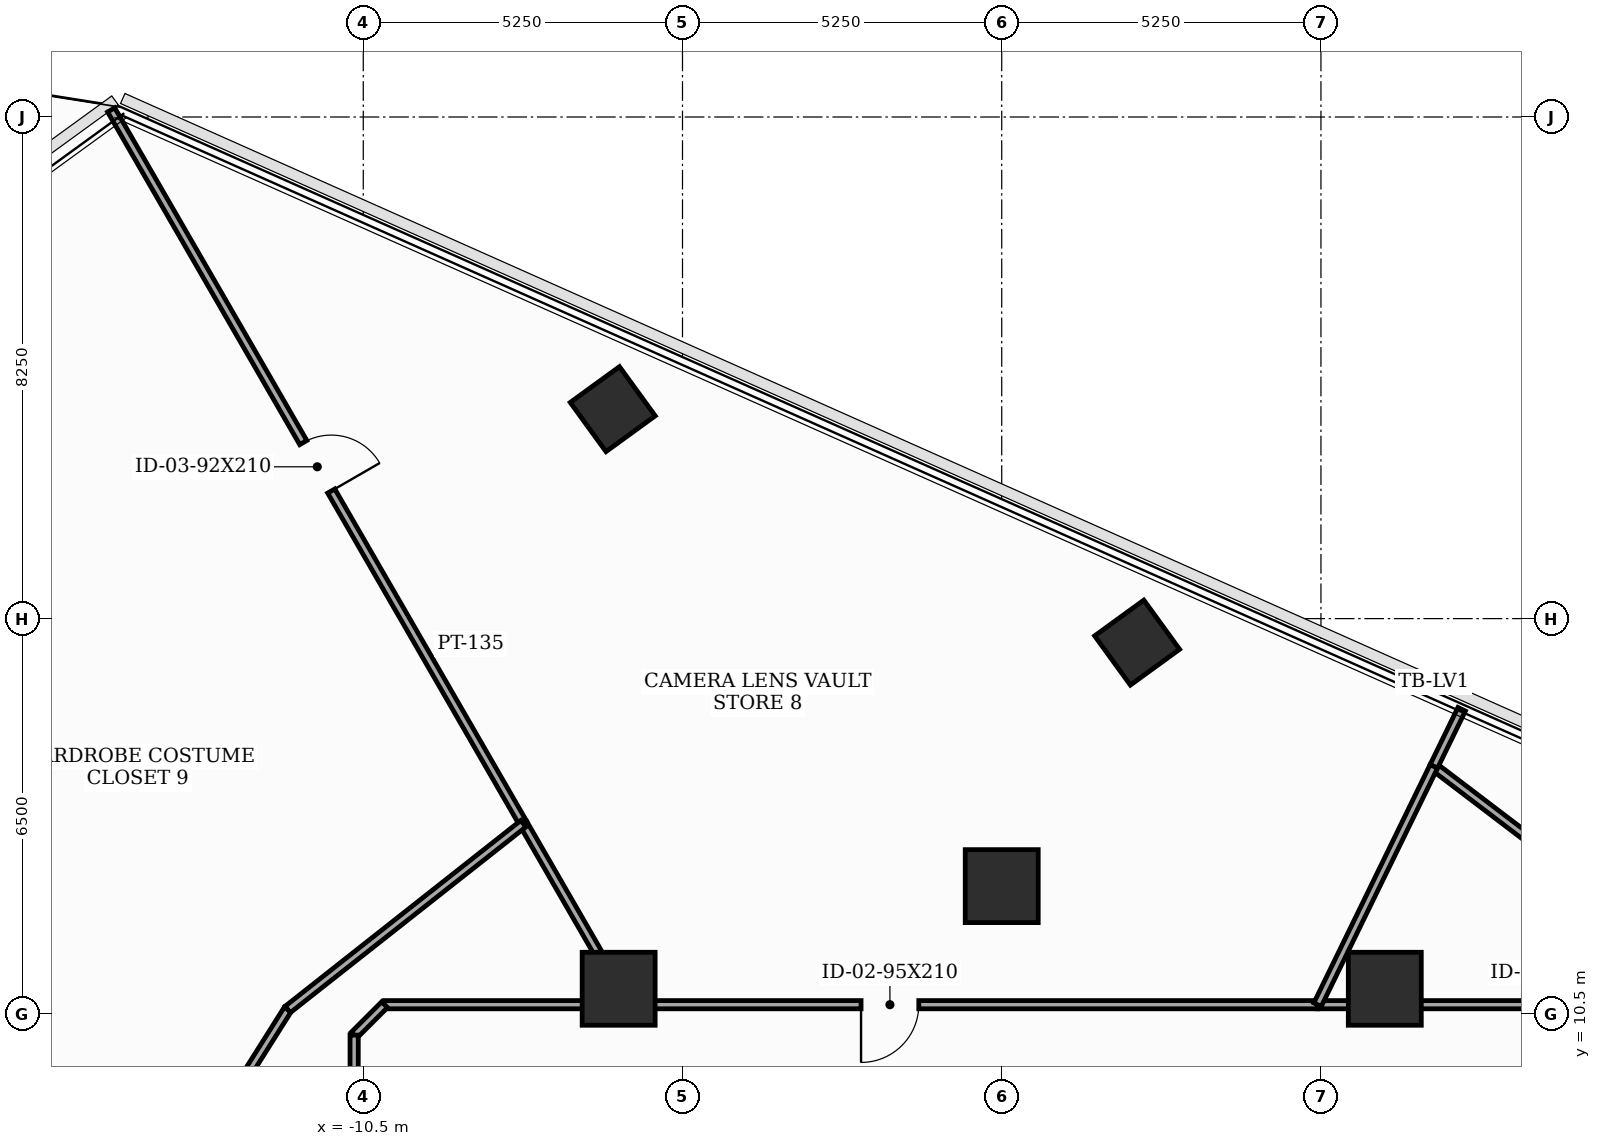
"""IFC4 building model, lengths in metres.
Left out: names, types, materials, properties, quantities, classifications, styles, units other than length and angle.
Written with IfcOpenShell. Run it as: python <this file> out.ifc"""

import sys

from ifc_helpers import new_model, si_unit, direction, frame, frame_2d, origin, origin_2d, place, context, subcontext, project, spatial, rectangle, extrude, element, fill, save


model = new_model("IFC4")
c1 = context("Model", 3, precision=1e-05, world=origin(), true_north=direction((0.0, 1.0)))
c2 = subcontext(c1, "Body", "Model", "MODEL_VIEW")
j1 = project(units=[si_unit("LENGTHUNIT", "METRE"), si_unit("PLANEANGLEUNIT", "RADIAN")], contexts=[c1])
p1 = place(None, origin())
s1 = spatial("IfcSite", under=j1, at=p1, CompositionType="ELEMENT")
p2 = place(p1, origin())
s2 = spatial("IfcBuilding", under=s1, at=p2, CompositionType="ELEMENT")
p3 = place(p2, frame((0.0, 0.0, 162.0)))
s3 = spatial("IfcBuildingStorey", under=s2, at=p3, CompositionType="ELEMENT", Elevation=162.0)
for number, where, z_axis, x_axis in (
    (1, (6.3, 10.912, 0.0), (0.0, 0.0, 1.0), (1.0, 0.0, 0.0)),
    (2, (0.0, 12.6, 0.0), (0.0, 0.0, 1.0), (1.0, 0.0, 0.0)),
    (3, (-6.3, 10.912, 0.0), (0.0, 0.0, 1.0), (1.0, 0.0, 0.0)),
):
    element("IfcColumn", number, at=place(p3, frame(where, z_axis=z_axis, x_axis=x_axis)), inside=s3, PredefinedType="COLUMN", context=c2, shape_type="SweptSolid", body=[
        extrude(rectangle(XDim=1.2, YDim=1.2, at=origin_2d()), origin(), (0.0, 0.0, 1.0), 3.7),
    ])
for number, where, z_axis, x_axis in (
    (4, (2.227, 16.605, 0.0), (0.0, 0.0, 1.0), (0.809, 0.588, 0.0)),
    (5, (-6.397, 20.445, 0.0), (0.0, 0.0, 1.0), (0.809, 0.588, 0.0)),
):
    element("IfcColumn", number, at=place(p3, frame(where, z_axis=z_axis, x_axis=x_axis)), inside=s3, PredefinedType="COLUMN", context=c2, shape_type="SweptSolid", body=[
        extrude(rectangle(XDim=1.0, YDim=1.0, at=origin_2d()), origin(), (0.0, 0.0, 1.0), 3.7),
    ])
p4 = place(p3, frame((10.15, 10.65, 0.0), z_axis=(0.0, 0.0, 1.0), x_axis=(-1.0, 0.0, 0.0)))
e6 = element("IfcWall", 6, at=p4, inside=s3, PredefinedType="PARTITIONING", context=c2, shape_type="SweptSolid", body=[
    extrude(rectangle(XDim=4.956, YDim=0.135, at=frame_2d((2.478, 0.0))), origin(), (0.0, 0.0, 1.0), 2.885),
])
p5 = place(p4, frame((0.516, 0.0, 0.0)))
e7 = element("IfcOpeningElement", 7, at=p5, cuts=e6, PredefinedType="OPENING", context=c2, shape_type="SweptSolid", body=[
    extrude(rectangle(XDim=0.95, YDim=2.1, at=frame_2d((0.475, 1.05))), frame((0.0, 0.077, 0.0), z_axis=(0.0, -1.0, 0.0), x_axis=(1.0, 0.0, 0.0)), (0.0, 0.0, 1.0), 0.155),
])
p6 = place(p3, frame((5.194, 10.65, 0.0), z_axis=(0.0, 0.0, 1.0), x_axis=(-1.0, 0.0, 0.0)))
e8 = element("IfcWall", 8, at=p6, inside=s3, PredefinedType="PARTITIONING", context=c2, shape_type="SweptSolid", body=[
    extrude(rectangle(XDim=11.343, YDim=0.135, at=frame_2d((5.671, 0.0))), origin(), (0.0, 0.0, 1.0), 2.885),
])
p7 = place(p6, frame((6.558, 0.0, 0.0)))
e9 = element("IfcOpeningElement", 9, at=p7, cuts=e8, PredefinedType="OPENING", context=c2, shape_type="SweptSolid", body=[
    extrude(rectangle(XDim=0.95, YDim=2.1, at=frame_2d((0.475, 1.05))), frame((0.0, 0.077, 0.0), z_axis=(0.0, -1.0, 0.0), x_axis=(1.0, 0.0, 0.0)), (0.0, 0.0, 1.0), 0.155),
])
p8 = place(p3, frame((-6.149, 10.65, 0.0), z_axis=(0.0, 0.0, 1.0), x_axis=(-1.0, 0.0, 0.0)))
e10 = element("IfcWall", 10, at=p8, inside=s3, PredefinedType="PARTITIONING", context=c2, shape_type="SweptSolid", body=[
    extrude(rectangle(XDim=4.001, YDim=0.135, at=frame_2d((2.0, 0.0))), origin(), (0.0, 0.0, 1.0), 2.885),
])
p9 = place(p3, frame((-10.15, 10.65, 0.0), z_axis=(0.0, 0.0, 1.0), x_axis=(-0.707106781187, -0.707106781187, 0.0)))
e11 = element("IfcWall", 11, at=p9, inside=s3, PredefinedType="PARTITIONING", context=c2, shape_type="SweptSolid", body=[
    extrude(rectangle(XDim=0.707, YDim=0.135, at=frame_2d((0.354, 0.0))), origin(), (0.0, 0.0, 1.0), 3.5),
])
p10 = place(p3, frame((-10.65, 10.15, 0.0), z_axis=(0.0, 0.0, 1.0), x_axis=(0.0, -1.0, 0.0)))
e12 = element("IfcWall", 12, at=p10, inside=s3, PredefinedType="PARTITIONING", context=c2, shape_type="SweptSolid", body=[
    extrude(rectangle(XDim=5.408, YDim=0.135, at=frame_2d((2.704, 0.0))), origin(), (0.0, 0.0, 1.0), 2.885),
])
p11 = place(p10, frame((0.607, 0.0, 0.0)))
e13 = element("IfcOpeningElement", 13, at=p11, cuts=e12, PredefinedType="OPENING", context=c2, shape_type="SweptSolid", body=[
    extrude(rectangle(XDim=0.95, YDim=2.1, at=frame_2d((0.475, 1.05))), frame((0.0, 0.077, 0.0), z_axis=(0.0, -1.0, 0.0), x_axis=(1.0, 0.0, 0.0)), (0.0, 0.0, 1.0), 0.155),
])
p12 = place(p3, frame((7.106, 14.569, 0.0), z_axis=(0.0, 0.0, 1.0), x_axis=(0.795990968219, -0.60530849863, 0.0)))
e14 = element("IfcWall", 14, at=p12, inside=s3, PredefinedType="PARTITIONING", context=c2, shape_type="SweptSolid", body=[
    extrude(rectangle(XDim=6.76, YDim=0.135, at=frame_2d((3.38, 0.0))), origin(), (0.0, 0.0, 1.0), 2.885),
])
p13 = place(p3, frame((7.564, 15.51, 0.0), z_axis=(0.0, 0.0, 1.0), x_axis=(-0.438230528202, -0.898862616951, 0.0)))
e15 = element("IfcWall", 15, at=p13, inside=s3, PredefinedType="PARTITIONING", context=c2, shape_type="SweptSolid", body=[
    extrude(rectangle(XDim=1.046, YDim=0.135, at=frame_2d((0.523, 0.0))), origin(), (0.0, 0.0, 1.0), 2.985),
])
p14 = place(p3, frame((7.106, 14.569, 0.0), z_axis=(0.0, 0.0, 1.0), x_axis=(-0.43843576568, -0.898762526684, 0.0)))
e16 = element("IfcWall", 16, at=p14, inside=s3, PredefinedType="PARTITIONING", context=c2, shape_type="SweptSolid", body=[
    extrude(rectangle(XDim=4.361, YDim=0.135, at=frame_2d((2.18, 0.0))), origin(), (0.0, 0.0, 1.0), 2.885),
])
p15 = place(p3, frame((-14.646, 25.367, 0.0), z_axis=(0.0, 0.0, 1.0), x_axis=(0.500047745944, -0.865997835896, 0.0)))
e17 = element("IfcWall", 17, at=p15, inside=s3, PredefinedType="PARTITIONING", context=c2, shape_type="SweptSolid", body=[
    extrude(rectangle(XDim=13.556, YDim=0.135, at=frame_2d((6.778, 0.0))), origin(), (0.0, 0.0, 1.0), 2.985),
])
p16 = place(p15, frame((6.318, 0.0, 0.0)))
e18 = element("IfcOpeningElement", 18, at=p16, cuts=e17, PredefinedType="OPENING", context=c2, shape_type="SweptSolid", body=[
    extrude(rectangle(XDim=0.92, YDim=2.1, at=frame_2d((0.46, 1.05))), frame((0.0, 0.077, 0.0), z_axis=(0.0, -1.0, 0.0), x_axis=(1.0, 0.0, 0.0)), (0.0, 0.0, 1.0), 0.155),
])
p17 = place(p3, frame((-7.867, 13.627, 0.0), z_axis=(0.0, 0.0, 1.0), x_axis=(0.499829032188, -0.866124089598, 0.0)))
e19 = element("IfcWall", 19, at=p17, inside=s3, PredefinedType="PARTITIONING", context=c2, shape_type="SweptSolid", body=[
    extrude(rectangle(XDim=3.437, YDim=0.135, at=frame_2d((1.719, 0.0))), origin(), (0.0, 0.0, 1.0), 2.885),
])
p18 = place(p3, frame((-14.374, 6.4, 0.0), z_axis=(0.0, 0.0, 1.0), x_axis=(0.53356651363, 0.845758106986, 0.0)))
e20 = element("IfcWall", 20, at=p18, inside=s3, PredefinedType="PARTITIONING", context=c2, shape_type="SweptSolid", body=[
    extrude(rectangle(XDim=4.933, YDim=0.135, at=frame_2d((2.467, 0.0))), origin(), (0.0, 0.0, 1.0), 2.885),
])
p19 = place(p3, frame((-11.742, 10.572, 0.0), z_axis=(0.0, 0.0, 1.0), x_axis=(0.785304323173, 0.619109941776, 0.0)))
e21 = element("IfcWall", 21, at=p19, inside=s3, PredefinedType="PARTITIONING", context=c2, shape_type="SweptSolid", body=[
    extrude(rectangle(XDim=4.934, YDim=0.135, at=frame_2d((2.467, 0.0))), origin(), (0.0, 0.0, 1.0), 3.5),
])
p20 = place(p7, origin())
e22 = element("IfcDoor", 22, at=p20, inside=s3, OperationType="SINGLE_SWING_RIGHT", PredefinedType="DOOR", context=c2, shape_type="SweptSolid", body=[
    extrude(rectangle(XDim=0.95, YDim=2.1, at=frame_2d((0.475, 1.05))), frame((0.0, 0.025, 0.0), z_axis=(0.0, -1.0, 0.0), x_axis=(1.0, 0.0, 0.0)), (0.0, 0.0, 1.0), 0.05),
])
fill(e9, e22)
p21 = place(p16, origin())
e23 = element("IfcDoor", 23, at=p21, inside=s3, OperationType="SINGLE_SWING_RIGHT", PredefinedType="DOOR", context=c2, shape_type="SweptSolid", body=[
    extrude(rectangle(XDim=0.92, YDim=2.1, at=frame_2d((0.46, 1.05))), frame((0.0, 0.025, 0.0), z_axis=(0.0, -1.0, 0.0), x_axis=(1.0, 0.0, 0.0)), (0.0, 0.0, 1.0), 0.05),
])
fill(e18, e23)
save(model, sys.argv[1])
